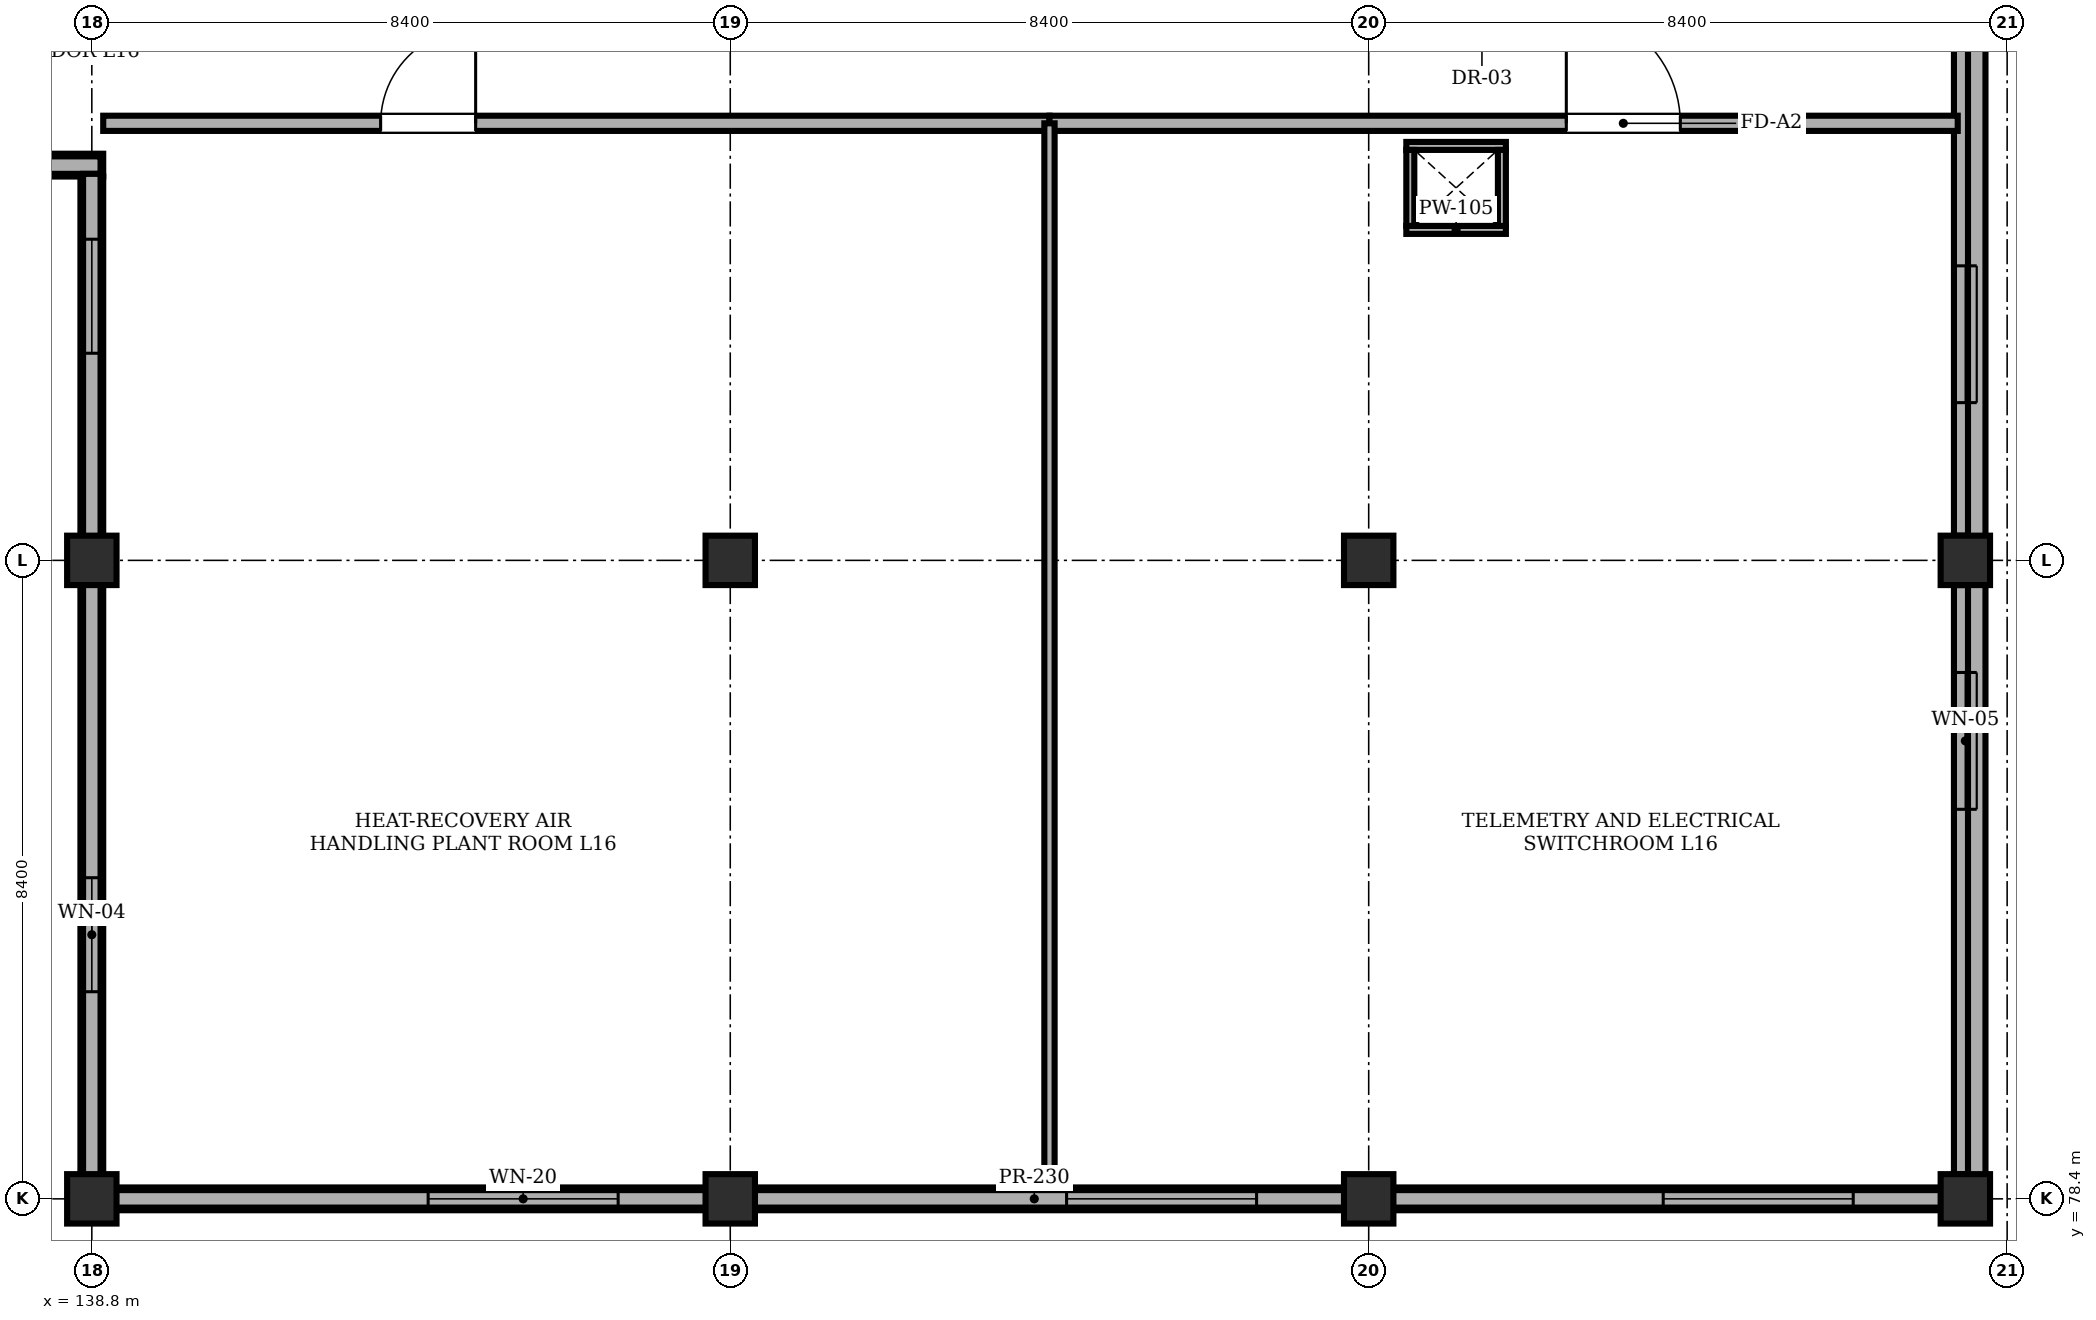
"""IFC4 building model, lengths in metres.
Left out: names, types, materials, properties, quantities, classifications, styles, units other than length and angle.
Written with IfcOpenShell. Run it as: python <this file> out.ifc"""

import sys

from ifc_helpers import new_model, si_unit, direction, frame, frame_2d, origin, origin_2d, place, context, subcontext, project, spatial, rectangle, extrude, element, fill, save


model = new_model("IFC4")
c1 = context("Model", 3, precision=1e-05, world=origin(), true_north=direction((0.0, 1.0)))
c2 = subcontext(c1, "Body", "Model", "MODEL_VIEW")
j1 = project(units=[si_unit("LENGTHUNIT", "METRE"), si_unit("PLANEANGLEUNIT", "RADIAN")], contexts=[c1])
p1 = place(None, origin())
s1 = spatial("IfcSite", under=j1, at=p1, CompositionType="ELEMENT")
p2 = place(p1, origin())
s2 = spatial("IfcBuilding", under=s1, at=p2, CompositionType="ELEMENT")
p3 = place(p2, frame((0.0, 0.0, 65.7)))
s3 = spatial("IfcBuildingStorey", under=s2, at=p3, CompositionType="ELEMENT", Elevation=65.7)
for number, where, z_axis, x_axis in (
    (1, (138.8, 78.4, 0.0), (0.0, 0.0, 1.0), (1.0, 0.0, 0.0)),
    (2, (138.8, 86.8, 0.0), (0.0, 0.0, 1.0), (1.0, 0.0, 0.0)),
    (3, (147.2, 78.4, 0.0), (0.0, 0.0, 1.0), (1.0, 0.0, 0.0)),
    (4, (147.2, 86.8, 0.0), (0.0, 0.0, 1.0), (1.0, 0.0, 0.0)),
    (5, (155.6, 78.4, 0.0), (0.0, 0.0, 1.0), (1.0, 0.0, 0.0)),
    (6, (155.6, 86.8, 0.0), (0.0, 0.0, 1.0), (1.0, 0.0, 0.0)),
    (7, (163.45, 78.4, 0.0), (0.0, 0.0, 1.0), (1.0, 0.0, 0.0)),
    (8, (163.45, 86.8, 0.0), (0.0, 0.0, 1.0), (1.0, 0.0, 0.0)),
):
    element("IfcColumn", number, at=place(p3, frame(where, z_axis=z_axis, x_axis=x_axis)), inside=s3, PredefinedType="COLUMN", context=c2, shape_type="SweptSolid", body=[
        extrude(rectangle(XDim=0.65, YDim=0.65, at=origin_2d()), origin(), (0.0, 0.0, 1.0), 4.3),
    ])
p4 = place(p3, frame((146.875, 78.4, 0.0), z_axis=(0.0, 0.0, 1.0), x_axis=(-1.0, 0.0, 0.0)))
e9 = element("IfcWall", 9, at=p4, inside=s3, PredefinedType="STANDARD", context=c2, shape_type="SweptSolid", body=[
    extrude(rectangle(XDim=7.75, YDim=0.3, at=frame_2d((3.875, 0.0))), origin(), (0.0, 0.0, 1.0), 3.7),
])
p5 = place(p4, frame((1.15, 0.0, 0.95)))
e10 = element("IfcOpeningElement", 10, at=p5, cuts=e9, PredefinedType="OPENING", context=c2, shape_type="SweptSolid", body=[
    extrude(rectangle(XDim=2.5, YDim=1.9, at=frame_2d((1.25, 0.95))), frame((0.0, 0.16, 0.0), z_axis=(0.0, -1.0, 0.0), x_axis=(1.0, 0.0, 0.0)), (0.0, 0.0, 1.0), 0.32),
])
p6 = place(p3, frame((155.275, 78.4, 0.0), z_axis=(0.0, 0.0, 1.0), x_axis=(-1.0, 0.0, 0.0)))
e11 = element("IfcWall", 11, at=p6, inside=s3, PredefinedType="STANDARD", context=c2, shape_type="SweptSolid", body=[
    extrude(rectangle(XDim=7.75, YDim=0.3, at=frame_2d((3.875, 0.0))), origin(), (0.0, 0.0, 1.0), 3.7),
])
p7 = place(p6, frame((1.15, 0.0, 0.95)))
e12 = element("IfcOpeningElement", 12, at=p7, cuts=e11, PredefinedType="OPENING", context=c2, shape_type="SweptSolid", body=[
    extrude(rectangle(XDim=2.5, YDim=1.9, at=frame_2d((1.25, 0.95))), frame((0.0, 0.16, 0.0), z_axis=(0.0, -1.0, 0.0), x_axis=(1.0, 0.0, 0.0)), (0.0, 0.0, 1.0), 0.32),
])
p8 = place(p3, frame((163.125, 78.4, 0.0), z_axis=(0.0, 0.0, 1.0), x_axis=(-1.0, 0.0, 0.0)))
e13 = element("IfcWall", 13, at=p8, inside=s3, PredefinedType="STANDARD", context=c2, shape_type="SweptSolid", body=[
    extrude(rectangle(XDim=7.2, YDim=0.3, at=frame_2d((3.6, 0.0))), origin(), (0.0, 0.0, 1.0), 3.7),
])
p9 = place(p8, frame((1.15, 0.0, 0.95)))
e14 = element("IfcOpeningElement", 14, at=p9, cuts=e13, PredefinedType="OPENING", context=c2, shape_type="SweptSolid", body=[
    extrude(rectangle(XDim=2.5, YDim=1.9, at=frame_2d((1.25, 0.95))), frame((0.0, 0.16, 0.0), z_axis=(0.0, -1.0, 0.0), x_axis=(1.0, 0.0, 0.0)), (0.0, 0.0, 1.0), 0.32),
])
p10 = place(p3, frame((163.45, 86.475, 0.0), z_axis=(0.0, 0.0, 1.0), x_axis=(0.0, -1.0, 0.0)))
e15 = element("IfcWall", 15, at=p10, inside=s3, PredefinedType="STANDARD", context=c2, shape_type="SweptSolid", body=[
    extrude(rectangle(XDim=7.75, YDim=0.3, at=frame_2d((3.875, 0.0))), origin(), (0.0, 0.0, 1.0), 3.7),
])
p11 = place(p10, frame((1.15, 0.0, 1.1)))
e16 = element("IfcOpeningElement", 16, at=p11, cuts=e15, PredefinedType="OPENING", context=c2, shape_type="SweptSolid", body=[
    extrude(rectangle(XDim=1.8, YDim=1.8, at=frame_2d((0.9, 0.9))), frame((0.0, 0.16, 0.0), z_axis=(0.0, -1.0, 0.0), x_axis=(1.0, 0.0, 0.0)), (0.0, 0.0, 1.0), 0.32),
])
p12 = place(p3, frame((163.45, 94.875, 0.0), z_axis=(0.0, 0.0, 1.0), x_axis=(0.0, -1.0, 0.0)))
e17 = element("IfcWall", 17, at=p12, inside=s3, PredefinedType="STANDARD", context=c2, shape_type="SweptSolid", body=[
    extrude(rectangle(XDim=7.75, YDim=0.3, at=frame_2d((3.875, 0.0))), origin(), (0.0, 0.0, 1.0), 3.7),
])
p13 = place(p12, frame((4.2, 0.0, 1.1)))
e18 = element("IfcOpeningElement", 18, at=p13, cuts=e17, PredefinedType="OPENING", context=c2, shape_type="SweptSolid", body=[
    extrude(rectangle(XDim=1.8, YDim=1.8, at=frame_2d((0.9, 0.9))), frame((0.0, 0.16, 0.0), z_axis=(0.0, -1.0, 0.0), x_axis=(1.0, 0.0, 0.0)), (0.0, 0.0, 1.0), 0.32),
])
p14 = place(p3, frame((138.8, 78.725, 0.0), z_axis=(0.0, 0.0, 1.0), x_axis=(0.0, 1.0, 0.0)))
e19 = element("IfcWall", 19, at=p14, inside=s3, PredefinedType="STANDARD", context=c2, shape_type="SweptSolid", body=[
    extrude(rectangle(XDim=7.75, YDim=0.3, at=frame_2d((3.875, 0.0))), origin(), (0.0, 0.0, 1.0), 3.7),
])
p15 = place(p14, frame((2.4, 0.0, 0.95)))
e20 = element("IfcOpeningElement", 20, at=p15, cuts=e19, PredefinedType="OPENING", context=c2, shape_type="SweptSolid", body=[
    extrude(rectangle(XDim=1.5, YDim=1.8, at=frame_2d((0.75, 0.9))), frame((0.0, 0.16, 0.0), z_axis=(0.0, -1.0, 0.0), x_axis=(1.0, 0.0, 0.0)), (0.0, 0.0, 1.0), 0.32),
])
p16 = place(p3, frame((138.8, 87.125, 0.0), z_axis=(0.0, 0.0, 1.0), x_axis=(0.0, 1.0, 0.0)))
e21 = element("IfcWall", 21, at=p16, inside=s3, PredefinedType="STANDARD", context=c2, shape_type="SweptSolid", body=[
    extrude(rectangle(XDim=4.725, YDim=0.3, at=frame_2d((2.363, 0.0))), origin(), (0.0, 0.0, 1.0), 3.7),
])
p17 = place(p16, frame((2.4, 0.0, 0.95)))
e22 = element("IfcOpeningElement", 22, at=p17, cuts=e21, PredefinedType="OPENING", context=c2, shape_type="SweptSolid", body=[
    extrude(rectangle(XDim=1.5, YDim=1.8, at=frame_2d((0.75, 0.9))), frame((0.0, 0.16, 0.0), z_axis=(0.0, -1.0, 0.0), x_axis=(1.0, 0.0, 0.0)), (0.0, 0.0, 1.0), 0.32),
])
p18 = place(p3, frame((138.95, 92.0, 0.0), z_axis=(0.0, 0.0, 1.0), x_axis=(-1.0, 0.0, 0.0)))
e23 = element("IfcWall", 23, at=p18, inside=s3, PredefinedType="STANDARD", context=c2, shape_type="SweptSolid", body=[
    extrude(rectangle(XDim=8.7, YDim=0.3, at=frame_2d((4.35, 0.0))), origin(), (0.0, 0.0, 1.0), 4.3),
])
p19 = place(p3, frame((138.685, 78.4, 4.5), z_axis=(0.0, 0.0, 1.0), x_axis=(1.0, 0.0, 0.0)))
e24 = element("IfcWall", 24, at=p19, inside=s3, PredefinedType="PARAPET", context=c2, shape_type="SweptSolid", body=[
    extrude(rectangle(XDim=25.03, YDim=0.23, at=frame_2d((12.515, 0.0))), origin(), (0.0, 0.0, 1.0), 1.35),
])
p20 = place(p3, frame((163.6, 78.515, 4.5), z_axis=(0.0, 0.0, 1.0), x_axis=(0.0, 1.0, 0.0)))
e25 = element("IfcWall", 25, at=p20, inside=s3, PredefinedType="PARAPET", context=c2, shape_type="SweptSolid", body=[
    extrude(rectangle(XDim=32.97, YDim=0.23, at=frame_2d((16.485, 0.0))), origin(), (0.0, 0.0, 1.0), 1.35),
])
p21 = place(p3, frame((130.285, 92.0, 4.5), z_axis=(0.0, 0.0, 1.0), x_axis=(1.0, 0.0, 0.0)))
e26 = element("IfcWall", 26, at=p21, inside=s3, PredefinedType="PARAPET", context=c2, shape_type="SweptSolid", body=[
    extrude(rectangle(XDim=8.63, YDim=0.23, at=frame_2d((4.315, 0.0))), origin(), (0.0, 0.0, 1.0), 1.35),
])
p22 = place(p3, frame((138.8, 91.885, 4.5), z_axis=(0.0, 0.0, 1.0), x_axis=(0.0, -1.0, 0.0)))
e27 = element("IfcWall", 27, at=p22, inside=s3, PredefinedType="PARAPET", context=c2, shape_type="SweptSolid", body=[
    extrude(rectangle(XDim=13.37, YDim=0.23, at=frame_2d((6.685, 0.0))), origin(), (0.0, 0.0, 1.0), 1.35),
])
p23 = place(p3, frame((138.95, 92.55, 0.0), z_axis=(0.0, 0.0, 1.0), x_axis=(1.0, 0.0, 0.0)))
e28 = element("IfcWall", 28, at=p23, inside=s3, PredefinedType="SOLIDWALL", context=c2, shape_type="SweptSolid", body=[
    extrude(rectangle(XDim=12.45, YDim=0.2, at=frame_2d((6.225, 0.0))), origin(), (0.0, 0.0, 1.0), 4.3),
])
p24 = place(p23, frame((3.65, 0.0, 0.0)))
e29 = element("IfcOpeningElement", 29, at=p24, cuts=e28, PredefinedType="OPENING", context=c2, shape_type="SweptSolid", body=[
    extrude(rectangle(XDim=1.25, YDim=2.2, at=frame_2d((0.625, 1.1))), frame((0.0, 0.11, 0.0), z_axis=(0.0, -1.0, 0.0), x_axis=(1.0, 0.0, 0.0)), (0.0, 0.0, 1.0), 0.22),
])
p25 = place(p3, frame((151.4, 92.55, 0.0), z_axis=(0.0, 0.0, 1.0), x_axis=(1.0, 0.0, 0.0)))
e30 = element("IfcWall", 30, at=p25, inside=s3, PredefinedType="SOLIDWALL", context=c2, shape_type="SweptSolid", body=[
    extrude(rectangle(XDim=11.95, YDim=0.2, at=frame_2d((5.975, 0.0))), origin(), (0.0, 0.0, 1.0), 4.3),
])
p26 = place(p25, frame((6.8, 0.0, 0.0)))
e31 = element("IfcOpeningElement", 31, at=p26, cuts=e30, PredefinedType="OPENING", context=c2, shape_type="SweptSolid", body=[
    extrude(rectangle(XDim=1.5, YDim=2.2, at=frame_2d((0.75, 1.1))), frame((0.0, 0.11, 0.0), z_axis=(0.0, -1.0, 0.0), x_axis=(1.0, 0.0, 0.0)), (0.0, 0.0, 1.0), 0.22),
])
p27 = place(p3, frame((151.4, 78.55, 0.0), z_axis=(0.0, 0.0, 1.0), x_axis=(0.0, 1.0, 0.0)))
e32 = element("IfcWall", 32, at=p27, inside=s3, PredefinedType="PARTITIONING", context=c2, shape_type="SweptSolid", body=[
    extrude(rectangle(XDim=14.0, YDim=0.135, at=frame_2d((7.0, 0.0))), origin(), (0.0, 0.0, 1.0), 3.85),
])
for number, where, z_axis, x_axis in (
    (33, (156.095, 91.147, 0.0), (0.0, 0.0, 1.0), (1.0, 0.0, 0.0)),
    (34, (156.095, 92.252, 0.0), (0.0, 0.0, 1.0), (1.0, 0.0, 0.0)),
):
    element("IfcWall", number, at=place(p3, frame(where, z_axis=z_axis, x_axis=x_axis)), inside=s3, PredefinedType="PARTITIONING", context=c2, shape_type="SweptSolid", body=[
        extrude(rectangle(XDim=1.31, YDim=0.105, at=frame_2d((0.655, 0.0))), origin(), (0.0, 0.0, 1.0), 4.3),
    ])
for number, where, z_axis, x_axis in (
    (35, (156.147, 91.2, 0.0), (0.0, 0.0, 1.0), (0.0, 1.0, 0.0)),
    (36, (157.353, 91.2, 0.0), (0.0, 0.0, 1.0), (0.0, 1.0, 0.0)),
):
    element("IfcWall", number, at=place(p3, frame(where, z_axis=z_axis, x_axis=x_axis)), inside=s3, PredefinedType="PARTITIONING", context=c2, shape_type="SweptSolid", body=[
        extrude(rectangle(XDim=1.0, YDim=0.105, at=frame_2d((0.5, 0.0))), origin(), (0.0, 0.0, 1.0), 4.3),
    ])
p28 = place(p5, origin())
e37 = element("IfcWindow", 37, at=p28, inside=s3, PartitioningType="TRIPLE_PANEL_VERTICAL", PredefinedType="WINDOW", context=c2, shape_type="SweptSolid", body=[
    extrude(rectangle(XDim=2.5, YDim=1.9, at=frame_2d((1.25, 0.95))), frame((0.0, 0.03, 0.0), z_axis=(0.0, -1.0, 0.0), x_axis=(1.0, 0.0, 0.0)), (0.0, 0.0, 1.0), 0.06),
])
fill(e10, e37)
p29 = place(p7, origin())
e38 = element("IfcWindow", 38, at=p29, inside=s3, PartitioningType="TRIPLE_PANEL_VERTICAL", PredefinedType="WINDOW", context=c2, shape_type="SweptSolid", body=[
    extrude(rectangle(XDim=2.5, YDim=1.9, at=frame_2d((1.25, 0.95))), frame((0.0, 0.03, 0.0), z_axis=(0.0, -1.0, 0.0), x_axis=(1.0, 0.0, 0.0)), (0.0, 0.0, 1.0), 0.06),
])
fill(e12, e38)
p30 = place(p9, origin())
e39 = element("IfcWindow", 39, at=p30, inside=s3, PartitioningType="TRIPLE_PANEL_VERTICAL", PredefinedType="WINDOW", context=c2, shape_type="SweptSolid", body=[
    extrude(rectangle(XDim=2.5, YDim=1.9, at=frame_2d((1.25, 0.95))), frame((0.0, 0.03, 0.0), z_axis=(0.0, -1.0, 0.0), x_axis=(1.0, 0.0, 0.0)), (0.0, 0.0, 1.0), 0.06),
])
fill(e14, e39)
p31 = place(p11, origin())
e40 = element("IfcWindow", 40, at=p31, inside=s3, PartitioningType="DOUBLE_PANEL_VERTICAL", PredefinedType="WINDOW", context=c2, shape_type="SweptSolid", body=[
    extrude(rectangle(XDim=1.8, YDim=1.8, at=frame_2d((0.9, 0.9))), frame((0.0, 0.03, 0.0), z_axis=(0.0, -1.0, 0.0), x_axis=(1.0, 0.0, 0.0)), (0.0, 0.0, 1.0), 0.06),
])
fill(e16, e40)
p32 = place(p13, origin())
e41 = element("IfcWindow", 41, at=p32, inside=s3, PartitioningType="DOUBLE_PANEL_VERTICAL", PredefinedType="WINDOW", context=c2, shape_type="SweptSolid", body=[
    extrude(rectangle(XDim=1.8, YDim=1.8, at=frame_2d((0.9, 0.9))), frame((0.0, 0.03, 0.0), z_axis=(0.0, -1.0, 0.0), x_axis=(1.0, 0.0, 0.0)), (0.0, 0.0, 1.0), 0.06),
])
fill(e18, e41)
p33 = place(p15, origin())
e42 = element("IfcWindow", 42, at=p33, inside=s3, PartitioningType="DOUBLE_PANEL_VERTICAL", PredefinedType="WINDOW", context=c2, shape_type="SweptSolid", body=[
    extrude(rectangle(XDim=1.5, YDim=1.8, at=frame_2d((0.75, 0.9))), frame((0.0, 0.03, 0.0), z_axis=(0.0, -1.0, 0.0), x_axis=(1.0, 0.0, 0.0)), (0.0, 0.0, 1.0), 0.06),
])
fill(e20, e42)
p34 = place(p17, origin())
e43 = element("IfcWindow", 43, at=p34, inside=s3, PartitioningType="DOUBLE_PANEL_VERTICAL", PredefinedType="WINDOW", context=c2, shape_type="SweptSolid", body=[
    extrude(rectangle(XDim=1.5, YDim=1.8, at=frame_2d((0.75, 0.9))), frame((0.0, 0.03, 0.0), z_axis=(0.0, -1.0, 0.0), x_axis=(1.0, 0.0, 0.0)), (0.0, 0.0, 1.0), 0.06),
])
fill(e22, e43)
p35 = place(p24, origin())
e44 = element("IfcDoor", 44, at=p35, inside=s3, OperationType="SINGLE_SWING_RIGHT", PredefinedType="DOOR", context=c2, shape_type="SweptSolid", body=[
    extrude(rectangle(XDim=1.25, YDim=2.2, at=frame_2d((0.625, 1.1))), frame((0.0, 0.025, 0.0), z_axis=(0.0, -1.0, 0.0), x_axis=(1.0, 0.0, 0.0)), (0.0, 0.0, 1.0), 0.05),
])
fill(e29, e44)
p36 = place(p26, origin())
e45 = element("IfcDoor", 45, at=p36, inside=s3, OperationType="SINGLE_SWING_LEFT", PredefinedType="DOOR", context=c2, shape_type="SweptSolid", body=[
    extrude(rectangle(XDim=1.5, YDim=2.2, at=frame_2d((0.75, 1.1))), frame((0.0, 0.025, 0.0), z_axis=(0.0, -1.0, 0.0), x_axis=(1.0, 0.0, 0.0)), (0.0, 0.0, 1.0), 0.05),
])
fill(e31, e45)
save(model, sys.argv[1])
